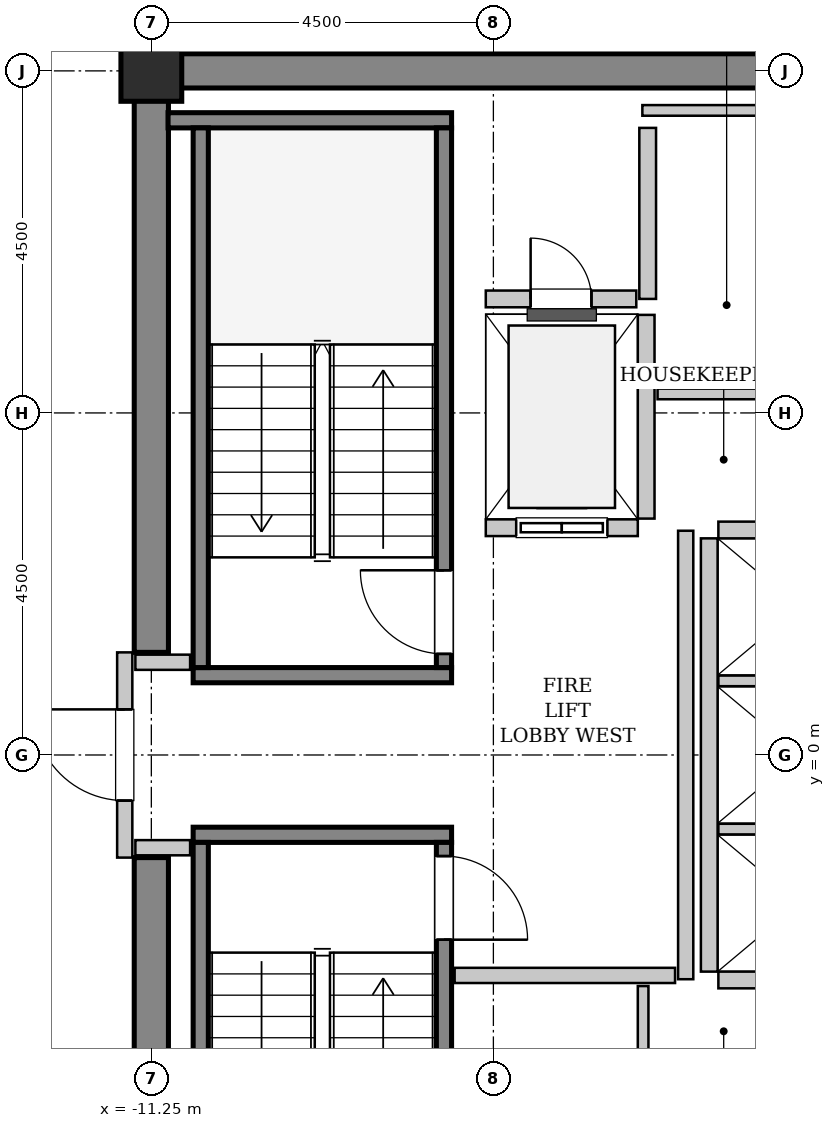
"""IFC4 building model, lengths in metres.
Left out: names, types, materials, properties, quantities, classifications, styles, units other than length and angle.
Written with IfcOpenShell. Run it as: python <this file> out.ifc"""

import sys

from ifc_helpers import new_model, si_unit, direction, frame, frame_2d, origin, origin_2d, place, context, subcontext, project, spatial, rectangle, hollow_rectangle, extrude, source, transform, mapped, element, fill, save


model = new_model("IFC4")
c1 = context("Model", 3, precision=1e-05, world=origin(), true_north=direction((0.0, 1.0)))
c2 = subcontext(c1, "Body", "Model", "MODEL_VIEW")
j1 = project(units=[si_unit("LENGTHUNIT", "METRE"), si_unit("PLANEANGLEUNIT", "RADIAN")], contexts=[c1])
p1 = place(None, origin())
s1 = spatial("IfcSite", under=j1, at=p1, CompositionType="ELEMENT")
p2 = place(p1, origin())
s2 = spatial("IfcBuilding", under=s1, at=p2, CompositionType="ELEMENT")
p3 = place(p2, frame((0.0, 0.0, 218.0)))
s3 = spatial("IfcBuildingStorey", under=s2, at=p3, CompositionType="ELEMENT", Elevation=218.0)
m1 = source(origin(), c2, "Body", "SweptSolid", [
    extrude(rectangle(XDim=9.925, YDim=0.45, at=frame_2d((4.962, 0.0))), origin(), (0.0, 0.0, 1.0), 3.8),
])
p4 = place(p3, frame((-11.475, 9.0, 0.0), z_axis=(0.0, 0.0, 1.0), x_axis=(1.0, 0.0, 0.0)))
e1 = element("IfcWall", 1, at=p4, inside=s3, PredefinedType="SHEAR", context=c2, shape_type="MappedRepresentation", body=[
    mapped(m1, transform((0.0, 0.0, 0.0), x_axis=(1.0, 0.0, 0.0), y_axis=(0.0, 1.0, 0.0), z_axis=(0.0, 0.0, 1.0), scale=1.0)),
])
m2 = source(origin(), c2, "Body", "SweptSolid", [
    extrude(rectangle(XDim=7.425, YDim=0.45, at=frame_2d((3.712, 0.0))), origin(), (0.0, 0.0, 1.0), 3.8),
])
for number, where, z_axis, x_axis in (
    (2, (-11.25, -8.775, 0.0), (0.0, 0.0, 1.0), (0.0, 1.0, 0.0)),
    (3, (-11.25, 1.35, 0.0), (0.0, 0.0, 1.0), (0.0, 1.0, 0.0)),
):
    element("IfcWall", number, at=place(p3, frame(where, z_axis=z_axis, x_axis=x_axis)), inside=s3, PredefinedType="SHEAR", context=c2, shape_type="MappedRepresentation", body=[
        mapped(m2, transform((0.0, 0.0, 0.0), x_axis=(1.0, 0.0, 0.0), y_axis=(0.0, 1.0, 0.0), z_axis=(0.0, 0.0, 1.0), scale=1.0)),
    ])
m3 = source(origin(), c2, "Body", "SweptSolid", [
    extrude(hollow_rectangle(XDim=0.8, YDim=0.8, WallThickness=0.04, InnerFilletRadius=0.04, OuterFilletRadius=0.08, at=origin_2d()), origin(), (0.0, 0.0, 1.0), 3.8),
])
p5 = place(p3, frame((-11.25, 9.0, 0.0), z_axis=(0.0, 0.0, 1.0), x_axis=(1.0, 0.0, 0.0)))
e4 = element("IfcColumn", 4, at=p5, inside=s3, PredefinedType="COLUMN", context=c2, shape_type="MappedRepresentation", body=[
    mapped(m3, transform((0.0, 0.0, 0.0), x_axis=(1.0, 0.0, 0.0), y_axis=(0.0, 1.0, 0.0), z_axis=(0.0, 0.0, 1.0), scale=1.0)),
])
m4 = source(origin(), c2, "Body", "SweptSolid", [
    extrude(rectangle(XDim=3.4, YDim=0.2, at=frame_2d((1.7, 0.0))), origin(), (0.0, 0.0, 1.0), 3.8),
])
p6 = place(p3, frame((-7.3, 1.05, 0.0), z_axis=(0.0, 0.0, 1.0), x_axis=(-1.0, 0.0, 0.0)))
e5 = element("IfcWall", 5, at=p6, inside=s3, PredefinedType="SOLIDWALL", context=c2, shape_type="MappedRepresentation", body=[
    mapped(m4, transform((0.0, 0.0, 0.0), x_axis=(1.0, 0.0, 0.0), y_axis=(0.0, 1.0, 0.0), z_axis=(0.0, 0.0, 1.0), scale=1.0)),
])
m5 = source(origin(), c2, "Body", "SweptSolid", [
    extrude(rectangle(XDim=3.73, YDim=0.2, at=frame_2d((1.865, 0.0))), origin(), (0.0, 0.0, 1.0), 3.8),
])
p7 = place(p3, frame((-7.3, 8.35, 0.0), z_axis=(0.0, 0.0, 1.0), x_axis=(-1.0, 0.0, 0.0)))
e6 = element("IfcWall", 6, at=p7, inside=s3, PredefinedType="SOLIDWALL", context=c2, shape_type="MappedRepresentation", body=[
    mapped(m5, transform((0.0, 0.0, 0.0), x_axis=(1.0, 0.0, 0.0), y_axis=(0.0, 1.0, 0.0), z_axis=(0.0, 0.0, 1.0), scale=1.0)),
])
m6 = source(origin(), c2, "Body", "SweptSolid", [
    extrude(rectangle(XDim=7.1, YDim=0.2, at=frame_2d((3.55, 0.0))), origin(), (0.0, 0.0, 1.0), 3.8),
])
p8 = place(p3, frame((-7.4, 1.15, 0.0), z_axis=(0.0, 0.0, 1.0), x_axis=(0.0, 1.0, 0.0)))
e7 = element("IfcWall", 7, at=p8, inside=s3, PredefinedType="SOLIDWALL", context=c2, shape_type="MappedRepresentation", body=[
    mapped(m6, transform((0.0, 0.0, 0.0), x_axis=(1.0, 0.0, 0.0), y_axis=(0.0, 1.0, 0.0), z_axis=(0.0, 0.0, 1.0), scale=1.0)),
])
p9 = place(p8, frame((0.18, 0.0, 0.0)))
e8 = element("IfcOpeningElement", 8, at=p9, cuts=e7, PredefinedType="OPENING", context=c2, shape_type="SweptSolid", body=[
    extrude(rectangle(XDim=1.1, YDim=2.15, at=frame_2d((0.55, 1.075))), frame((0.0, 0.11, 0.0), z_axis=(0.0, -1.0, 0.0), x_axis=(1.0, 0.0, 0.0)), (0.0, 0.0, 1.0), 0.22),
])
p10 = place(p3, frame((-10.6, 1.15, 0.0), z_axis=(0.0, 0.0, 1.0), x_axis=(0.0, 1.0, 0.0)))
e9 = element("IfcWall", 9, at=p10, inside=s3, PredefinedType="SOLIDWALL", context=c2, shape_type="MappedRepresentation", body=[
    mapped(m6, transform((0.0, 0.0, 0.0), x_axis=(1.0, 0.0, 0.0), y_axis=(0.0, 1.0, 0.0), z_axis=(0.0, 0.0, 1.0), scale=1.0)),
])
p11 = place(p3, frame((-10.7, -1.05, 0.0), z_axis=(0.0, 0.0, 1.0), x_axis=(1.0, 0.0, 0.0)))
e10 = element("IfcWall", 10, at=p11, inside=s3, PredefinedType="SOLIDWALL", context=c2, shape_type="MappedRepresentation", body=[
    mapped(m4, transform((0.0, 0.0, 0.0), x_axis=(1.0, 0.0, 0.0), y_axis=(0.0, 1.0, 0.0), z_axis=(0.0, 0.0, 1.0), scale=1.0)),
])
p12 = place(p3, frame((-10.6, -1.15, 0.0), z_axis=(0.0, 0.0, 1.0), x_axis=(0.0, -1.0, 0.0)))
e11 = element("IfcWall", 11, at=p12, inside=s3, PredefinedType="SOLIDWALL", context=c2, shape_type="MappedRepresentation", body=[
    mapped(m6, transform((0.0, 0.0, 0.0), x_axis=(1.0, 0.0, 0.0), y_axis=(0.0, 1.0, 0.0), z_axis=(0.0, 0.0, 1.0), scale=1.0)),
])
p13 = place(p3, frame((-7.4, -1.15, 0.0), z_axis=(0.0, 0.0, 1.0), x_axis=(0.0, -1.0, 0.0)))
e12 = element("IfcWall", 12, at=p13, inside=s3, PredefinedType="SOLIDWALL", context=c2, shape_type="MappedRepresentation", body=[
    mapped(m6, transform((0.0, 0.0, 0.0), x_axis=(1.0, 0.0, 0.0), y_axis=(0.0, 1.0, 0.0), z_axis=(0.0, 0.0, 1.0), scale=1.0)),
])
p14 = place(p13, frame((0.18, 0.0, 0.0)))
e13 = element("IfcOpeningElement", 13, at=p14, cuts=e12, PredefinedType="OPENING", context=c2, shape_type="SweptSolid", body=[
    extrude(rectangle(XDim=1.1, YDim=2.15, at=frame_2d((0.55, 1.075))), frame((0.0, 0.11, 0.0), z_axis=(0.0, -1.0, 0.0), x_axis=(1.0, 0.0, 0.0)), (0.0, 0.0, 1.0), 0.22),
])
m7 = source(origin(), c2, "Body", "SweptSolid", [
    extrude(rectangle(XDim=2.0, YDim=0.22, at=frame_2d((1.0, 0.0))), origin(), (0.0, 0.0, 1.0), 3.535),
])
p15 = place(p3, frame((-6.85, 2.99, 0.0), z_axis=(0.0, 0.0, 1.0), x_axis=(1.0, 0.0, 0.0)))
e14 = element("IfcWall", 14, at=p15, inside=s3, PredefinedType="SOLIDWALL", context=c2, shape_type="MappedRepresentation", body=[
    mapped(m7, transform((0.0, 0.0, 0.0), x_axis=(1.0, 0.0, 0.0), y_axis=(0.0, 1.0, 0.0), z_axis=(0.0, 0.0, 1.0), scale=1.0)),
])
p16 = place(p15, frame((0.4, 0.0, 0.0)))
e15 = element("IfcOpeningElement", 15, at=p16, cuts=e14, PredefinedType="OPENING", context=c2, shape_type="SweptSolid", body=[
    extrude(rectangle(XDim=1.2, YDim=2.2, at=frame_2d((0.6, 1.1))), frame((0.0, 0.12, 0.0), z_axis=(0.0, -1.0, 0.0), x_axis=(1.0, 0.0, 0.0)), (0.0, 0.0, 1.0), 0.24),
])
m8 = source(origin(), c2, "Body", "SweptSolid", [
    extrude(rectangle(XDim=2.68, YDim=0.22, at=frame_2d((1.34, 0.0))), origin(), (0.0, 0.0, 1.0), 3.535),
])
p17 = place(p3, frame((-4.74, 3.11, 0.0), z_axis=(0.0, 0.0, 1.0), x_axis=(0.0, 1.0, 0.0)))
e16 = element("IfcWall", 16, at=p17, inside=s3, PredefinedType="SOLIDWALL", context=c2, shape_type="MappedRepresentation", body=[
    mapped(m8, transform((0.0, 0.0, 0.0), x_axis=(1.0, 0.0, 0.0), y_axis=(0.0, 1.0, 0.0), z_axis=(0.0, 0.0, 1.0), scale=1.0)),
])
m9 = source(origin(), c2, "Body", "SweptSolid", [
    extrude(rectangle(XDim=5.7, YDim=0.22, at=frame_2d((2.85, 0.0))), origin(), (0.0, 0.0, 1.0), 3.535),
])
p18 = place(p3, frame((-3.91, 2.85, 0.0), z_axis=(0.0, 0.0, 1.0), x_axis=(0.0, -1.0, 0.0)))
e17 = element("IfcWall", 17, at=p18, inside=s3, PredefinedType="SOLIDWALL", context=c2, shape_type="MappedRepresentation", body=[
    mapped(m9, transform((0.0, 0.0, 0.0), x_axis=(1.0, 0.0, 0.0), y_axis=(0.0, 1.0, 0.0), z_axis=(0.0, 0.0, 1.0), scale=1.0)),
])
m10 = source(origin(), c2, "Body", "SweptSolid", [
    extrude(rectangle(XDim=2.13, YDim=0.22, at=frame_2d((1.065, 0.0))), origin(), (0.0, 0.0, 1.0), 3.535),
])
p19 = place(p3, frame((-3.79, -2.96, 0.0), z_axis=(0.0, 0.0, 1.0), x_axis=(1.0, 0.0, 0.0)))
e18 = element("IfcWall", 18, at=p19, inside=s3, PredefinedType="SOLIDWALL", context=c2, shape_type="MappedRepresentation", body=[
    mapped(m10, transform((0.0, 0.0, 0.0), x_axis=(1.0, 0.0, 0.0), y_axis=(0.0, 1.0, 0.0), z_axis=(0.0, 0.0, 1.0), scale=1.0)),
])
m11 = source(origin(), c2, "Body", "SweptSolid", [
    extrude(rectangle(XDim=2.13, YDim=0.14, at=frame_2d((1.065, 0.0))), origin(), (0.0, 0.0, 1.0), 3.535),
])
for number, where, z_axis, x_axis in (
    (19, (-3.79, -0.975, 0.0), (0.0, 0.0, 1.0), (1.0, 0.0, 0.0)),
    (20, (-3.79, 0.975, 0.0), (0.0, 0.0, 1.0), (1.0, 0.0, 0.0)),
):
    element("IfcWall", number, at=place(p3, frame(where, z_axis=z_axis, x_axis=x_axis)), inside=s3, PredefinedType="PARTITIONING", context=c2, shape_type="MappedRepresentation", body=[
        mapped(m11, transform((0.0, 0.0, 0.0), x_axis=(1.0, 0.0, 0.0), y_axis=(0.0, 1.0, 0.0), z_axis=(0.0, 0.0, 1.0), scale=1.0)),
    ])
p20 = place(p3, frame((-1.66, 2.96, 0.0), z_axis=(0.0, 0.0, 1.0), x_axis=(-1.0, 0.0, 0.0)))
e21 = element("IfcWall", 21, at=p20, inside=s3, PredefinedType="SOLIDWALL", context=c2, shape_type="MappedRepresentation", body=[
    mapped(m10, transform((0.0, 0.0, 0.0), x_axis=(1.0, 0.0, 0.0), y_axis=(0.0, 1.0, 0.0), z_axis=(0.0, 0.0, 1.0), scale=1.0)),
])
m12 = source(origin(), c2, "Body", "SweptSolid", [
    extrude(rectangle(XDim=2.25, YDim=0.22, at=frame_2d((1.125, 0.0))), origin(), (0.0, 0.0, 1.0), 3.535),
])
p21 = place(p3, frame((-4.72, 6.0, 0.0), z_axis=(0.0, 0.0, 1.0), x_axis=(0.0, 1.0, 0.0)))
e22 = element("IfcWall", 22, at=p21, inside=s3, PredefinedType="SOLIDWALL", context=c2, shape_type="MappedRepresentation", body=[
    mapped(m12, transform((0.0, 0.0, 0.0), x_axis=(1.0, 0.0, 0.0), y_axis=(0.0, 1.0, 0.0), z_axis=(0.0, 0.0, 1.0), scale=1.0)),
])
m13 = source(origin(), c2, "Body", "SweptSolid", [
    extrude(rectangle(XDim=1.98, YDim=0.22, at=frame_2d((0.99, 0.0))), origin(), (0.0, 0.0, 1.0), 3.535),
])
p22 = place(p3, frame((-6.85, 6.0, 0.0), z_axis=(0.0, 0.0, 1.0), x_axis=(1.0, 0.0, 0.0)))
e23 = element("IfcWall", 23, at=p22, inside=s3, PredefinedType="SOLIDWALL", context=c2, shape_type="MappedRepresentation", body=[
    mapped(m13, transform((0.0, 0.0, 0.0), x_axis=(1.0, 0.0, 0.0), y_axis=(0.0, 1.0, 0.0), z_axis=(0.0, 0.0, 1.0), scale=1.0)),
])
p23 = place(p22, frame((0.59, 0.0, 0.0)))
e24 = element("IfcOpeningElement", 24, at=p23, cuts=e23, PredefinedType="OPENING", context=c2, shape_type="SweptSolid", body=[
    extrude(rectangle(XDim=0.8, YDim=2.0, at=frame_2d((0.4, 1.0))), frame((0.0, 0.12, 0.0), z_axis=(0.0, -1.0, 0.0), x_axis=(1.0, 0.0, 0.0)), (0.0, 0.0, 1.0), 0.24),
])
m14 = source(origin(), c2, "Body", "SweptSolid", [
    extrude(rectangle(XDim=2.7, YDim=0.2, at=frame_2d((1.35, 0.0))), origin(), (0.0, 0.0, 1.0), 2.625),
])
p24 = place(p3, frame((-11.6, -1.35, 0.0), z_axis=(0.0, 0.0, 1.0), x_axis=(0.0, 1.0, 0.0)))
e25 = element("IfcWall", 25, at=p24, inside=s3, PredefinedType="PARTITIONING", context=c2, shape_type="MappedRepresentation", body=[
    mapped(m14, transform((0.0, 0.0, 0.0), x_axis=(1.0, 0.0, 0.0), y_axis=(0.0, 1.0, 0.0), z_axis=(0.0, 0.0, 1.0), scale=1.0)),
])
p25 = place(p24, frame((0.75, 0.0, 0.0)))
e26 = element("IfcOpeningElement", 26, at=p25, cuts=e25, PredefinedType="OPENING", context=c2, shape_type="SweptSolid", body=[
    extrude(rectangle(XDim=1.2, YDim=2.15, at=frame_2d((0.6, 1.075))), frame((0.0, 0.11, 0.0), z_axis=(0.0, -1.0, 0.0), x_axis=(1.0, 0.0, 0.0)), (0.0, 0.0, 1.0), 0.22),
])
m15 = source(origin(), c2, "Body", "SweptSolid", [
    extrude(rectangle(XDim=5.9, YDim=0.2, at=frame_2d((2.95, 0.0))), origin(), (0.0, 0.0, 1.0), 3.535),
])
p26 = place(p3, frame((-4.22, -2.95, 0.0), z_axis=(0.0, 0.0, 1.0), x_axis=(0.0, 1.0, 0.0)))
e27 = element("IfcWall", 27, at=p26, inside=s3, PredefinedType="PARTITIONING", context=c2, shape_type="MappedRepresentation", body=[
    mapped(m15, transform((0.0, 0.0, 0.0), x_axis=(1.0, 0.0, 0.0), y_axis=(0.0, 1.0, 0.0), z_axis=(0.0, 0.0, 1.0), scale=1.0)),
])
m16 = source(origin(), c2, "Body", "SweptSolid", [
    extrude(rectangle(XDim=2.9, YDim=0.2, at=frame_2d((1.45, 0.0))), origin(), (0.0, 0.0, 1.0), 3.535),
])
p27 = place(p3, frame((-7.26, -2.9, 0.0), z_axis=(0.0, 0.0, 1.0), x_axis=(1.0, 0.0, 0.0)))
e28 = element("IfcWall", 28, at=p27, inside=s3, PredefinedType="PARTITIONING", context=c2, shape_type="MappedRepresentation", body=[
    mapped(m16, transform((0.0, 0.0, 0.0), x_axis=(1.0, 0.0, 0.0), y_axis=(0.0, 1.0, 0.0), z_axis=(0.0, 0.0, 1.0), scale=1.0)),
])
m17 = source(origin(), c2, "Body", "SweptSolid", [
    extrude(rectangle(XDim=0.72, YDim=0.2, at=frame_2d((0.36, 0.0))), origin(), (0.0, 0.0, 1.0), 3.535),
])
for number, where, z_axis, x_axis in (
    (29, (-11.46, 1.22, 0.0), (0.0, 0.0, 1.0), (1.0, 0.0, 0.0)),
    (30, (-11.46, -1.22, 0.0), (0.0, 0.0, 1.0), (1.0, 0.0, 0.0)),
):
    element("IfcWall", number, at=place(p3, frame(where, z_axis=z_axis, x_axis=x_axis)), inside=s3, PredefinedType="PARTITIONING", context=c2, shape_type="MappedRepresentation", body=[
        mapped(m17, transform((0.0, 0.0, 0.0), x_axis=(1.0, 0.0, 0.0), y_axis=(0.0, 1.0, 0.0), z_axis=(0.0, 0.0, 1.0), scale=1.0)),
    ])
m18 = source(origin(), c2, "Body", "SweptSolid", [
    extrude(rectangle(XDim=2.95, YDim=0.14, at=frame_2d((1.475, 0.0))), origin(), (0.0, 0.0, 1.0), 3.535),
])
p28 = place(p3, frame((-4.59, 4.75, 0.0), z_axis=(0.0, 0.0, 1.0), x_axis=(1.0, 0.0, 0.0)))
e31 = element("IfcWall", 31, at=p28, inside=s3, PredefinedType="PARTITIONING", context=c2, shape_type="MappedRepresentation", body=[
    mapped(m18, transform((0.0, 0.0, 0.0), x_axis=(1.0, 0.0, 0.0), y_axis=(0.0, 1.0, 0.0), z_axis=(0.0, 0.0, 1.0), scale=1.0)),
])
m19 = source(origin(), c2, "Body", "SweptSolid", [
    extrude(rectangle(XDim=3.15, YDim=0.14, at=frame_2d((1.575, 0.0))), origin(), (0.0, 0.0, 1.0), 3.535),
])
p29 = place(p3, frame((-4.79, 8.48, 0.0), z_axis=(0.0, 0.0, 1.0), x_axis=(1.0, 0.0, 0.0)))
e32 = element("IfcWall", 32, at=p29, inside=s3, PredefinedType="PARTITIONING", context=c2, shape_type="MappedRepresentation", body=[
    mapped(m19, transform((0.0, 0.0, 0.0), x_axis=(1.0, 0.0, 0.0), y_axis=(0.0, 1.0, 0.0), z_axis=(0.0, 0.0, 1.0), scale=1.0)),
])
m20 = source(origin(), c2, "Body", "SweptSolid", [
    extrude(rectangle(XDim=1.1, YDim=0.14, at=frame_2d((0.55, 0.0))), origin(), (0.0, 0.0, 1.0), 3.535),
])
p30 = place(p3, frame((-4.78, -4.14, 0.0), z_axis=(0.0, 0.0, 1.0), x_axis=(0.0, 1.0, 0.0)))
e33 = element("IfcWall", 33, at=p30, inside=s3, PredefinedType="PARTITIONING", context=c2, shape_type="MappedRepresentation", body=[
    mapped(m20, transform((0.0, 0.0, 0.0), x_axis=(1.0, 0.0, 0.0), y_axis=(0.0, 1.0, 0.0), z_axis=(0.0, 0.0, 1.0), scale=1.0)),
])
m21 = source(origin(), c2, "Body", "SweptSolid", [
    extrude(rectangle(XDim=1.1, YDim=2.15, at=frame_2d((0.55, 1.075))), frame((0.0, 0.025, 0.0), z_axis=(0.0, -1.0, 0.0), x_axis=(1.0, 0.0, 0.0)), (0.0, 0.0, 1.0), 0.05),
])
p31 = place(p9, origin())
e34 = element("IfcDoor", 34, at=p31, inside=s3, OperationType="SINGLE_SWING_RIGHT", PredefinedType="DOOR", context=c2, shape_type="MappedRepresentation", body=[
    mapped(m21, transform((0.0, 0.0, 0.0), x_axis=(1.0, 0.0, 0.0), y_axis=(0.0, 1.0, 0.0), z_axis=(0.0, 0.0, 1.0), scale=1.0)),
])
fill(e8, e34)
p32 = place(p14, origin())
e35 = element("IfcDoor", 35, at=p32, inside=s3, OperationType="SINGLE_SWING_RIGHT", PredefinedType="DOOR", context=c2, shape_type="MappedRepresentation", body=[
    mapped(m21, transform((0.0, 0.0, 0.0), x_axis=(1.0, 0.0, 0.0), y_axis=(0.0, 1.0, 0.0), z_axis=(0.0, 0.0, 1.0), scale=1.0)),
])
fill(e13, e35)
m22 = source(origin(), c2, "Body", "SweptSolid", [
    extrude(rectangle(XDim=1.2, YDim=2.2, at=frame_2d((0.6, 1.1))), frame((0.0, 0.025, 0.0), z_axis=(0.0, -1.0, 0.0), x_axis=(1.0, 0.0, 0.0)), (0.0, 0.0, 1.0), 0.05),
])
p33 = place(p16, origin())
e36 = element("IfcDoor", 36, at=p33, inside=s3, OperationType="SLIDING_TO_LEFT", PredefinedType="DOOR", context=c2, shape_type="MappedRepresentation", body=[
    mapped(m22, transform((0.0, 0.0, 0.0), x_axis=(1.0, 0.0, 0.0), y_axis=(0.0, 1.0, 0.0), z_axis=(0.0, 0.0, 1.0), scale=1.0)),
])
fill(e15, e36)
m23 = source(origin(), c2, "Body", "SweptSolid", [
    extrude(rectangle(XDim=0.8, YDim=2.0, at=frame_2d((0.4, 1.0))), frame((0.0, 0.025, 0.0), z_axis=(0.0, -1.0, 0.0), x_axis=(1.0, 0.0, 0.0)), (0.0, 0.0, 1.0), 0.05),
])
p34 = place(p23, origin())
e37 = element("IfcDoor", 37, at=p34, inside=s3, OperationType="SINGLE_SWING_LEFT", PredefinedType="TRAPDOOR", context=c2, shape_type="MappedRepresentation", body=[
    mapped(m23, transform((0.0, 0.0, 0.0), x_axis=(1.0, 0.0, 0.0), y_axis=(0.0, 1.0, 0.0), z_axis=(0.0, 0.0, 1.0), scale=1.0)),
])
fill(e24, e37)
m24 = source(origin(), c2, "Body", "SweptSolid", [
    extrude(rectangle(XDim=1.2, YDim=2.15, at=frame_2d((0.6, 1.075))), frame((0.0, 0.025, 0.0), z_axis=(0.0, -1.0, 0.0), x_axis=(1.0, 0.0, 0.0)), (0.0, 0.0, 1.0), 0.05),
])
p35 = place(p25, origin())
e38 = element("IfcDoor", 38, at=p35, inside=s3, OperationType="SINGLE_SWING_RIGHT", PredefinedType="DOOR", context=c2, shape_type="MappedRepresentation", body=[
    mapped(m24, transform((0.0, 0.0, 0.0), x_axis=(1.0, 0.0, 0.0), y_axis=(0.0, 1.0, 0.0), z_axis=(0.0, 0.0, 1.0), scale=1.0)),
])
fill(e26, e38)
save(model, sys.argv[1])
